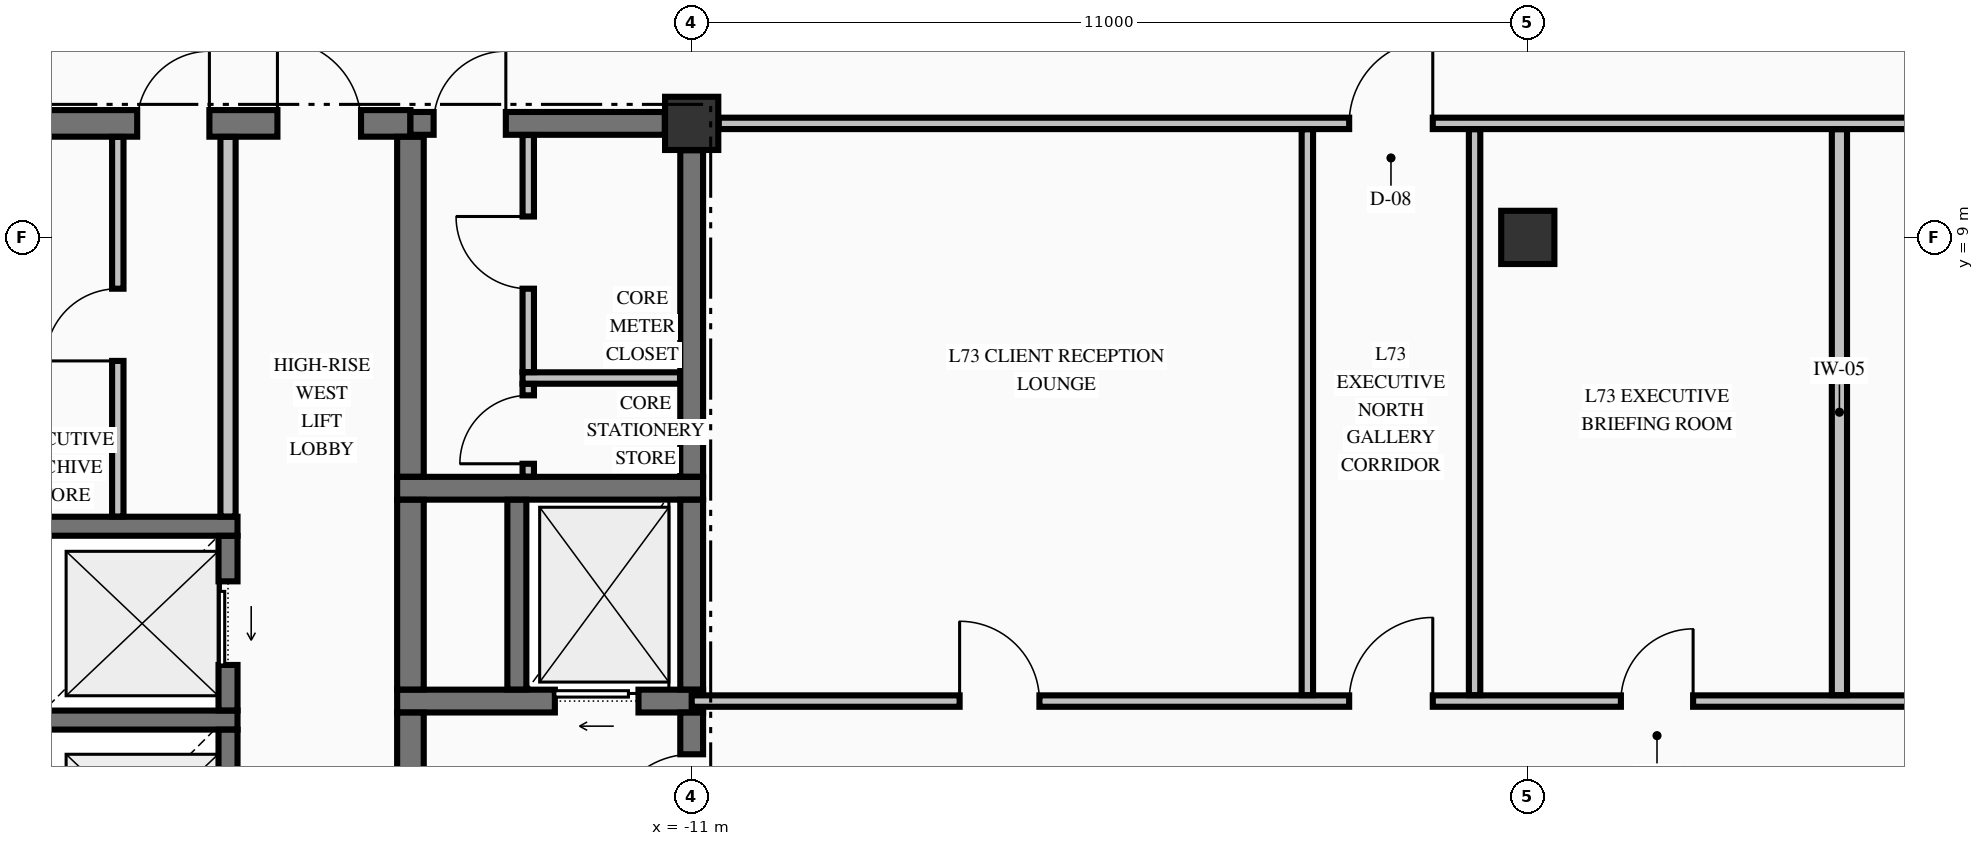
"""IFC4 building model, lengths in metres.
Left out: names, types, materials, properties, quantities, classifications, styles, units other than length and angle.
Written with IfcOpenShell. Run it as: python <this file> out.ifc"""

import sys

from ifc_helpers import new_model, si_unit, direction, frame, frame_2d, origin, origin_2d, place, context, subcontext, project, spatial, rectangle, extrude, element, fill, save


model = new_model("IFC4")
c1 = context("Model", 3, precision=1e-05, world=origin(), true_north=direction((0.0, 1.0)))
c2 = subcontext(c1, "Body", "Model", "MODEL_VIEW")
j1 = project(units=[si_unit("LENGTHUNIT", "METRE"), si_unit("PLANEANGLEUNIT", "RADIAN")], contexts=[c1])
p1 = place(None, origin())
s1 = spatial("IfcSite", under=j1, at=p1, CompositionType="ELEMENT")
p2 = place(p1, origin())
s2 = spatial("IfcBuilding", under=s1, at=p2, CompositionType="ELEMENT")
p3 = place(p2, frame((0.0, 0.0, 274.32)))
s3 = spatial("IfcBuildingStorey", under=s2, at=p3, CompositionType="ELEMENT", Elevation=274.32)
for number, where, z_axis, x_axis in (
    (1, (-11.0, 10.5, -0.25), (0.0, 0.0, 1.0), (1.0, 0.0, 0.0)),
    (2, (0.0, 9.0, -0.25), (0.0, 0.0, 1.0), (1.0, 0.0, 0.0)),
):
    element("IfcColumn", number, at=place(p3, frame(where, z_axis=z_axis, x_axis=x_axis)), inside=s3, PredefinedType="COLUMN", context=c2, shape_type="SweptSolid", body=[
        extrude(rectangle(XDim=0.7, YDim=0.7, at=origin_2d()), origin(), (0.0, 0.0, 1.0), 3.565),
    ])
p4 = place(p3, frame((-20.175, 2.65, 0.0), z_axis=(0.0, 0.0, 1.0), x_axis=(1.0, 0.0, 0.0)))
e3 = element("IfcWall", 3, at=p4, inside=s3, PredefinedType="SOLIDWALL", context=c2, shape_type="SweptSolid", body=[
    extrude(rectangle(XDim=3.2, YDim=0.25, at=frame_2d((1.6, 0.0))), origin(), (0.0, 0.0, 1.0), 3.315),
])
p5 = place(p3, frame((-14.875, 2.9, 0.0), z_axis=(0.0, 0.0, 1.0), x_axis=(1.0, 0.0, 0.0)))
e4 = element("IfcWall", 4, at=p5, inside=s3, PredefinedType="SHEAR", context=c2, shape_type="SweptSolid", body=[
    extrude(rectangle(XDim=4.025, YDim=0.3, at=frame_2d((2.012, 0.0))), origin(), (0.0, 0.0, 1.0), 3.315),
])
p6 = place(p5, frame((2.075, 0.0, 0.0)))
e5 = element("IfcOpeningElement", 5, at=p6, cuts=e4, PredefinedType="OPENING", context=c2, shape_type="SweptSolid", body=[
    extrude(rectangle(XDim=1.1, YDim=2.2, at=frame_2d((0.55, 1.1))), frame((0.0, 0.16, 0.0), z_axis=(0.0, -1.0, 0.0), x_axis=(1.0, 0.0, 0.0)), (0.0, 0.0, 1.0), 0.32),
])
p7 = place(p3, frame((-20.175, 5.2, 0.0), z_axis=(0.0, 0.0, 1.0), x_axis=(1.0, 0.0, 0.0)))
e6 = element("IfcWall", 6, at=p7, inside=s3, PredefinedType="SOLIDWALL", context=c2, shape_type="SweptSolid", body=[
    extrude(rectangle(XDim=3.2, YDim=0.25, at=frame_2d((1.6, 0.0))), origin(), (0.0, 0.0, 1.0), 3.315),
])
p8 = place(p3, frame((-14.875, 5.7, 0.0), z_axis=(0.0, 0.0, 1.0), x_axis=(1.0, 0.0, 0.0)))
e7 = element("IfcWall", 7, at=p8, inside=s3, PredefinedType="SHEAR", context=c2, shape_type="SweptSolid", body=[
    extrude(rectangle(XDim=4.025, YDim=0.3, at=frame_2d((2.012, 0.0))), origin(), (0.0, 0.0, 1.0), 3.315),
])
p9 = place(p3, frame((-19.646, 10.5, 0.0), z_axis=(0.0, 0.0, 1.0), x_axis=(1.0, 0.0, 0.0)))
e8 = element("IfcWall", 8, at=p9, inside=s3, PredefinedType="SHEAR", context=c2, shape_type="SweptSolid", body=[
    extrude(rectangle(XDim=4.946, YDim=0.35, at=frame_2d((2.473, 0.0))), origin(), (0.0, 0.0, 1.0), 3.315),
])
p10 = place(p9, frame((3.196, 0.0, 0.0)))
e9 = element("IfcOpeningElement", 9, at=p10, cuts=e8, PredefinedType="OPENING", context=c2, shape_type="SweptSolid", body=[
    extrude(rectangle(XDim=1.1, YDim=2.15, at=frame_2d((0.55, 1.075))), frame((0.0, 0.185, 0.0), z_axis=(0.0, -1.0, 0.0), x_axis=(1.0, 0.0, 0.0)), (0.0, 0.0, 1.0), 0.37),
])
p11 = place(p9, frame((1.351, 0.0, 0.0)))
e10 = element("IfcOpeningElement", 10, at=p11, cuts=e8, PredefinedType="OPENING", context=c2, shape_type="SweptSolid", body=[
    extrude(rectangle(XDim=0.95, YDim=2.15, at=frame_2d((0.475, 1.075))), frame((0.0, 0.185, 0.0), z_axis=(0.0, -1.0, 0.0), x_axis=(1.0, 0.0, 0.0)), (0.0, 0.0, 1.0), 0.37),
])
p12 = place(p3, frame((-14.7, 10.5, 0.0), z_axis=(0.0, 0.0, 1.0), x_axis=(1.0, 0.0, 0.0)))
e11 = element("IfcWall", 11, at=p12, inside=s3, PredefinedType="SHEAR", context=c2, shape_type="SweptSolid", body=[
    extrude(rectangle(XDim=3.346, YDim=0.3, at=frame_2d((1.673, 0.0))), origin(), (0.0, 0.0, 1.0), 3.315),
])
p13 = place(p12, frame((0.305, 0.0, 0.0)))
e12 = element("IfcOpeningElement", 12, at=p13, cuts=e11, PredefinedType="OPENING", context=c2, shape_type="SweptSolid", body=[
    extrude(rectangle(XDim=0.95, YDim=2.15, at=frame_2d((0.475, 1.075))), frame((0.0, 0.16, 0.0), z_axis=(0.0, -1.0, 0.0), x_axis=(1.0, 0.0, 0.0)), (0.0, 0.0, 1.0), 0.32),
])
p14 = place(p3, frame((-11.0, 2.9, 0.0), z_axis=(0.0, 0.0, 1.0), x_axis=(1.0, 0.0, 0.0)))
e13 = element("IfcWall", 13, at=p14, inside=s3, PredefinedType="PARTITIONING", context=c2, shape_type="SweptSolid", body=[
    extrude(rectangle(XDim=22.0, YDim=0.15, at=frame_2d((11.0, 0.0))), origin(), (0.0, 0.0, 1.0), 3.315),
])
p15 = place(p14, frame((8.65, 0.0, 0.0)))
e14 = element("IfcOpeningElement", 14, at=p15, cuts=e13, PredefinedType="OPENING", context=c2, shape_type="SweptSolid", body=[
    extrude(rectangle(XDim=1.1, YDim=2.15, at=frame_2d((0.55, 1.075))), frame((0.0, 0.085, 0.0), z_axis=(0.0, -1.0, 0.0), x_axis=(1.0, 0.0, 0.0)), (0.0, 0.0, 1.0), 0.17),
])
p16 = place(p14, frame((3.525, 0.0, 0.0)))
e15 = element("IfcOpeningElement", 15, at=p16, cuts=e13, PredefinedType="OPENING", context=c2, shape_type="SweptSolid", body=[
    extrude(rectangle(XDim=1.05, YDim=2.15, at=frame_2d((0.525, 1.075))), frame((0.0, 0.085, 0.0), z_axis=(0.0, -1.0, 0.0), x_axis=(1.0, 0.0, 0.0)), (0.0, 0.0, 1.0), 0.17),
])
p17 = place(p14, frame((12.225, 0.0, 0.0)))
e16 = element("IfcOpeningElement", 16, at=p17, cuts=e13, PredefinedType="OPENING", context=c2, shape_type="SweptSolid", body=[
    extrude(rectangle(XDim=0.95, YDim=2.15, at=frame_2d((0.475, 1.075))), frame((0.0, 0.085, 0.0), z_axis=(0.0, -1.0, 0.0), x_axis=(1.0, 0.0, 0.0)), (0.0, 0.0, 1.0), 0.17),
])
p18 = place(p14, frame((18.075, 0.0, 0.0)))
e17 = element("IfcOpeningElement", 17, at=p18, cuts=e13, PredefinedType="OPENING", context=c2, shape_type="SweptSolid", body=[
    extrude(rectangle(XDim=0.95, YDim=2.15, at=frame_2d((0.475, 1.075))), frame((0.0, 0.085, 0.0), z_axis=(0.0, -1.0, 0.0), x_axis=(1.0, 0.0, 0.0)), (0.0, 0.0, 1.0), 0.17),
])
p19 = place(p3, frame((-13.225, 7.15, 0.0), z_axis=(0.0, 0.0, 1.0), x_axis=(1.0, 0.0, 0.0)))
e18 = element("IfcWall", 18, at=p19, inside=s3, PredefinedType="PARTITIONING", context=c2, shape_type="SweptSolid", body=[
    extrude(rectangle(XDim=2.072, YDim=0.15, at=frame_2d((1.036, 0.0))), origin(), (0.0, 0.0, 1.0), 3.315),
])
p20 = place(p3, frame((-10.644, 10.5, 0.0), z_axis=(0.0, 0.0, 1.0), x_axis=(1.0, 0.0, 0.0)))
e19 = element("IfcWall", 19, at=p20, inside=s3, PredefinedType="PARTITIONING", context=c2, shape_type="SweptSolid", body=[
    extrude(rectangle(XDim=21.288, YDim=0.15, at=frame_2d((10.644, 0.0))), origin(), (0.0, 0.0, 1.0), 3.315),
])
p21 = place(p20, frame((8.294, 0.0, 0.0)))
e20 = element("IfcOpeningElement", 20, at=p21, cuts=e19, PredefinedType="OPENING", context=c2, shape_type="SweptSolid", body=[
    extrude(rectangle(XDim=1.1, YDim=2.15, at=frame_2d((0.55, 1.075))), frame((0.0, 0.085, 0.0), z_axis=(0.0, -1.0, 0.0), x_axis=(1.0, 0.0, 0.0)), (0.0, 0.0, 1.0), 0.17),
])
p22 = place(p3, frame((-17.1, -0.098, 0.0), z_axis=(0.0, 0.0, 1.0), x_axis=(0.0, 1.0, 0.0)))
e21 = element("IfcWall", 21, at=p22, inside=s3, PredefinedType="SOLIDWALL", context=c2, shape_type="SweptSolid", body=[
    extrude(rectangle(XDim=2.621, YDim=0.25, at=frame_2d((1.311, 0.0))), origin(), (0.0, 0.0, 1.0), 3.315),
])
p23 = place(p22, frame((0.748, 0.0, 0.0)))
e22 = element("IfcOpeningElement", 22, at=p23, cuts=e21, PredefinedType="OPENING", context=c2, shape_type="SweptSolid", body=[
    extrude(rectangle(XDim=1.1, YDim=2.2, at=frame_2d((0.55, 1.1))), frame((0.0, 0.135, 0.0), z_axis=(0.0, -1.0, 0.0), x_axis=(1.0, 0.0, 0.0)), (0.0, 0.0, 1.0), 0.27),
])
p24 = place(p3, frame((-17.1, 2.777, 0.0), z_axis=(0.0, 0.0, 1.0), x_axis=(0.0, 1.0, 0.0)))
e23 = element("IfcWall", 23, at=p24, inside=s3, PredefinedType="SOLIDWALL", context=c2, shape_type="SweptSolid", body=[
    extrude(rectangle(XDim=2.296, YDim=0.25, at=frame_2d((1.148, 0.0))), origin(), (0.0, 0.0, 1.0), 3.315),
])
p25 = place(p24, frame((0.598, 0.0, 0.0)))
e24 = element("IfcOpeningElement", 24, at=p25, cuts=e23, PredefinedType="OPENING", context=c2, shape_type="SweptSolid", body=[
    extrude(rectangle(XDim=1.1, YDim=2.2, at=frame_2d((0.55, 1.1))), frame((0.0, 0.135, 0.0), z_axis=(0.0, -1.0, 0.0), x_axis=(1.0, 0.0, 0.0)), (0.0, 0.0, 1.0), 0.27),
])
p26 = place(p3, frame((-14.7, -0.098, 0.0), z_axis=(0.0, 0.0, 1.0), x_axis=(0.0, 1.0, 0.0)))
e25 = element("IfcWall", 25, at=p26, inside=s3, PredefinedType="SHEAR", context=c2, shape_type="SweptSolid", body=[
    extrude(rectangle(XDim=2.846, YDim=0.35, at=frame_2d((1.423, 0.0))), origin(), (0.0, 0.0, 1.0), 3.315),
])
p27 = place(p3, frame((-14.7, 3.052, 0.0), z_axis=(0.0, 0.0, 1.0), x_axis=(0.0, 1.0, 0.0)))
e26 = element("IfcWall", 26, at=p27, inside=s3, PredefinedType="SHEAR", context=c2, shape_type="SweptSolid", body=[
    extrude(rectangle(XDim=2.496, YDim=0.35, at=frame_2d((1.248, 0.0))), origin(), (0.0, 0.0, 1.0), 3.315),
])
p28 = place(p3, frame((-14.7, 5.852, 0.0), z_axis=(0.0, 0.0, 1.0), x_axis=(0.0, 1.0, 0.0)))
e27 = element("IfcWall", 27, at=p28, inside=s3, PredefinedType="SHEAR", context=c2, shape_type="SweptSolid", body=[
    extrude(rectangle(XDim=4.471, YDim=0.35, at=frame_2d((2.235, 0.0))), origin(), (0.0, 0.0, 1.0), 3.315),
])
p29 = place(p3, frame((-13.3, 3.052, 0.0), z_axis=(0.0, 0.0, 1.0), x_axis=(0.0, 1.0, 0.0)))
e28 = element("IfcWall", 28, at=p29, inside=s3, PredefinedType="SOLIDWALL", context=c2, shape_type="SweptSolid", body=[
    extrude(rectangle(XDim=2.496, YDim=0.25, at=frame_2d((1.248, 0.0))), origin(), (0.0, 0.0, 1.0), 3.315),
])
p30 = place(p3, frame((-11.0, 0.354, 0.0), z_axis=(0.0, 0.0, 1.0), x_axis=(0.0, 1.0, 0.0)))
e29 = element("IfcWall", 29, at=p30, inside=s3, PredefinedType="SHEAR", context=c2, shape_type="SweptSolid", body=[
    extrude(rectangle(XDim=2.394, YDim=0.3, at=frame_2d((1.197, 0.0))), origin(), (0.0, 0.0, 1.0), 3.315),
])
p31 = place(p30, frame((0.746, 0.0, 0.0)))
e30 = element("IfcOpeningElement", 30, at=p31, cuts=e29, PredefinedType="OPENING", context=c2, shape_type="SweptSolid", body=[
    extrude(rectangle(XDim=1.1, YDim=2.15, at=frame_2d((0.55, 1.075))), frame((0.0, 0.16, 0.0), z_axis=(0.0, -1.0, 0.0), x_axis=(1.0, 0.0, 0.0)), (0.0, 0.0, 1.0), 0.32),
])
p32 = place(p3, frame((-11.0, 3.052, 0.0), z_axis=(0.0, 0.0, 1.0), x_axis=(0.0, 1.0, 0.0)))
e31 = element("IfcWall", 31, at=p32, inside=s3, PredefinedType="SHEAR", context=c2, shape_type="SweptSolid", body=[
    extrude(rectangle(XDim=2.496, YDim=0.3, at=frame_2d((1.248, 0.0))), origin(), (0.0, 0.0, 1.0), 3.315),
])
p33 = place(p3, frame((-11.0, 5.852, 0.0), z_axis=(0.0, 0.0, 1.0), x_axis=(0.0, 1.0, 0.0)))
e32 = element("IfcWall", 32, at=p33, inside=s3, PredefinedType="SHEAR", context=c2, shape_type="SweptSolid", body=[
    extrude(rectangle(XDim=4.294, YDim=0.3, at=frame_2d((2.147, 0.0))), origin(), (0.0, 0.0, 1.0), 3.315),
])
p34 = place(p3, frame((-18.55, 5.328, 0.0), z_axis=(0.0, 0.0, 1.0), x_axis=(0.0, 1.0, 0.0)))
e33 = element("IfcWall", 33, at=p34, inside=s3, PredefinedType="PARTITIONING", context=c2, shape_type="SweptSolid", body=[
    extrude(rectangle(XDim=4.994, YDim=0.15, at=frame_2d((2.497, 0.0))), origin(), (0.0, 0.0, 1.0), 3.315),
])
p35 = place(p34, frame((2.047, 0.0, 0.0)))
e34 = element("IfcOpeningElement", 34, at=p35, cuts=e33, PredefinedType="OPENING", context=c2, shape_type="SweptSolid", body=[
    extrude(rectangle(XDim=0.95, YDim=2.15, at=frame_2d((0.475, 1.075))), frame((0.0, 0.085, 0.0), z_axis=(0.0, -1.0, 0.0), x_axis=(1.0, 0.0, 0.0)), (0.0, 0.0, 1.0), 0.17),
])
p36 = place(p3, frame((-17.1, 5.328, 0.0), z_axis=(0.0, 0.0, 1.0), x_axis=(0.0, 1.0, 0.0)))
e35 = element("IfcWall", 35, at=p36, inside=s3, PredefinedType="PARTITIONING", context=c2, shape_type="SweptSolid", body=[
    extrude(rectangle(XDim=4.994, YDim=0.2, at=frame_2d((2.497, 0.0))), origin(), (0.0, 0.0, 1.0), 3.315),
])
p37 = place(p3, frame((-13.15, 5.853, 0.0), z_axis=(0.0, 0.0, 1.0), x_axis=(0.0, 1.0, 0.0)))
e36 = element("IfcWall", 36, at=p37, inside=s3, PredefinedType="PARTITIONING", context=c2, shape_type="SweptSolid", body=[
    extrude(rectangle(XDim=1.219, YDim=0.15, at=frame_2d((0.609, 0.0))), origin(), (0.0, 0.0, 1.0), 3.315),
])
p38 = place(p37, frame((0.169, 0.0, 0.0)))
e37 = element("IfcOpeningElement", 37, at=p38, cuts=e36, PredefinedType="OPENING", context=c2, shape_type="SweptSolid", body=[
    extrude(rectangle(XDim=0.9, YDim=2.15, at=frame_2d((0.45, 1.075))), frame((0.0, 0.085, 0.0), z_axis=(0.0, -1.0, 0.0), x_axis=(1.0, 0.0, 0.0)), (0.0, 0.0, 1.0), 0.17),
])
p39 = place(p3, frame((-13.15, 7.228, 0.0), z_axis=(0.0, 0.0, 1.0), x_axis=(0.0, 1.0, 0.0)))
e38 = element("IfcWall", 38, at=p39, inside=s3, PredefinedType="PARTITIONING", context=c2, shape_type="SweptSolid", body=[
    extrude(rectangle(XDim=3.119, YDim=0.15, at=frame_2d((1.56, 0.0))), origin(), (0.0, 0.0, 1.0), 3.315),
])
p40 = place(p39, frame((1.097, 0.0, 0.0)))
e39 = element("IfcOpeningElement", 39, at=p40, cuts=e38, PredefinedType="OPENING", context=c2, shape_type="SweptSolid", body=[
    extrude(rectangle(XDim=0.95, YDim=2.15, at=frame_2d((0.475, 1.075))), frame((0.0, 0.085, 0.0), z_axis=(0.0, -1.0, 0.0), x_axis=(1.0, 0.0, 0.0)), (0.0, 0.0, 1.0), 0.17),
])
for number, where, z_axis, x_axis in (
    (40, (-2.9, 2.978, 0.0), (0.0, 0.0, 1.0), (0.0, 1.0, 0.0)),
    (41, (-0.7, 2.978, 0.0), (0.0, 0.0, 1.0), (0.0, 1.0, 0.0)),
):
    element("IfcWall", number, at=place(p3, frame(where, z_axis=z_axis, x_axis=x_axis)), inside=s3, PredefinedType="PARTITIONING", context=c2, shape_type="SweptSolid", body=[
        extrude(rectangle(XDim=7.444, YDim=0.15, at=frame_2d((3.722, 0.0))), origin(), (0.0, 0.0, 1.0), 3.315),
    ])
p41 = place(p3, frame((4.1, 2.978, 0.0), z_axis=(0.0, 0.0, 1.0), x_axis=(0.0, 1.0, 0.0)))
e42 = element("IfcWall", 42, at=p41, inside=s3, PredefinedType="PARTITIONING", context=c2, shape_type="SweptSolid", body=[
    extrude(rectangle(XDim=7.444, YDim=0.2, at=frame_2d((3.722, 0.0))), origin(), (0.0, 0.0, 1.0), 3.315),
])
p42 = place(p31, origin())
e43 = element("IfcDoor", 43, at=p42, inside=s3, OperationType="SINGLE_SWING_LEFT", PredefinedType="DOOR", context=c2, shape_type="SweptSolid", body=[
    extrude(rectangle(XDim=1.1, YDim=2.15, at=frame_2d((0.55, 1.075))), frame((0.0, 0.025, 0.0), z_axis=(0.0, -1.0, 0.0), x_axis=(1.0, 0.0, 0.0)), (0.0, 0.0, 1.0), 0.05),
])
fill(e30, e43)
p43 = place(p6, origin())
e44 = element("IfcDoor", 44, at=p43, inside=s3, OperationType="SLIDING_TO_LEFT", PredefinedType="DOOR", context=c2, shape_type="SweptSolid", body=[
    extrude(rectangle(XDim=1.1, YDim=2.2, at=frame_2d((0.55, 1.1))), frame((0.0, 0.025, 0.0), z_axis=(0.0, -1.0, 0.0), x_axis=(1.0, 0.0, 0.0)), (0.0, 0.0, 1.0), 0.05),
])
fill(e5, e44)
p44 = place(p13, origin())
e45 = element("IfcDoor", 45, at=p44, inside=s3, OperationType="SINGLE_SWING_RIGHT", PredefinedType="DOOR", context=c2, shape_type="SweptSolid", body=[
    extrude(rectangle(XDim=0.95, YDim=2.15, at=frame_2d((0.475, 1.075))), frame((0.0, 0.025, 0.0), z_axis=(0.0, -1.0, 0.0), x_axis=(1.0, 0.0, 0.0)), (0.0, 0.0, 1.0), 0.05),
])
fill(e12, e45)
p45 = place(p38, origin())
e46 = element("IfcDoor", 46, at=p45, inside=s3, OperationType="SINGLE_SWING_LEFT", PredefinedType="DOOR", context=c2, shape_type="SweptSolid", body=[
    extrude(rectangle(XDim=0.9, YDim=2.15, at=frame_2d((0.45, 1.075))), frame((0.0, 0.025, 0.0), z_axis=(0.0, -1.0, 0.0), x_axis=(1.0, 0.0, 0.0)), (0.0, 0.0, 1.0), 0.05),
])
fill(e37, e46)
p46 = place(p40, origin())
e47 = element("IfcDoor", 47, at=p46, inside=s3, OperationType="SINGLE_SWING_RIGHT", PredefinedType="DOOR", context=c2, shape_type="SweptSolid", body=[
    extrude(rectangle(XDim=0.95, YDim=2.15, at=frame_2d((0.475, 1.075))), frame((0.0, 0.025, 0.0), z_axis=(0.0, -1.0, 0.0), x_axis=(1.0, 0.0, 0.0)), (0.0, 0.0, 1.0), 0.05),
])
fill(e39, e47)
p47 = place(p25, origin())
e48 = element("IfcDoor", 48, at=p47, inside=s3, OperationType="SLIDING_TO_LEFT", PredefinedType="DOOR", context=c2, shape_type="SweptSolid", body=[
    extrude(rectangle(XDim=1.1, YDim=2.2, at=frame_2d((0.55, 1.1))), frame((0.0, 0.025, 0.0), z_axis=(0.0, -1.0, 0.0), x_axis=(1.0, 0.0, 0.0)), (0.0, 0.0, 1.0), 0.05),
])
fill(e24, e48)
p48 = place(p10, origin())
e49 = element("IfcDoor", 49, at=p48, inside=s3, OperationType="SINGLE_SWING_LEFT", PredefinedType="DOOR", context=c2, shape_type="SweptSolid", body=[
    extrude(rectangle(XDim=1.1, YDim=2.15, at=frame_2d((0.55, 1.075))), frame((0.0, 0.025, 0.0), z_axis=(0.0, -1.0, 0.0), x_axis=(1.0, 0.0, 0.0)), (0.0, 0.0, 1.0), 0.05),
])
fill(e9, e49)
p49 = place(p11, origin())
e50 = element("IfcDoor", 50, at=p49, inside=s3, OperationType="SINGLE_SWING_RIGHT", PredefinedType="DOOR", context=c2, shape_type="SweptSolid", body=[
    extrude(rectangle(XDim=0.95, YDim=2.15, at=frame_2d((0.475, 1.075))), frame((0.0, 0.025, 0.0), z_axis=(0.0, -1.0, 0.0), x_axis=(1.0, 0.0, 0.0)), (0.0, 0.0, 1.0), 0.05),
])
fill(e10, e50)
p50 = place(p35, origin())
e51 = element("IfcDoor", 51, at=p50, inside=s3, OperationType="SINGLE_SWING_LEFT", PredefinedType="DOOR", context=c2, shape_type="SweptSolid", body=[
    extrude(rectangle(XDim=0.95, YDim=2.15, at=frame_2d((0.475, 1.075))), frame((0.0, 0.025, 0.0), z_axis=(0.0, -1.0, 0.0), x_axis=(1.0, 0.0, 0.0)), (0.0, 0.0, 1.0), 0.05),
])
fill(e34, e51)
p51 = place(p21, origin())
e52 = element("IfcDoor", 52, at=p51, inside=s3, OperationType="SINGLE_SWING_RIGHT", PredefinedType="DOOR", context=c2, shape_type="SweptSolid", body=[
    extrude(rectangle(XDim=1.1, YDim=2.15, at=frame_2d((0.55, 1.075))), frame((0.0, 0.025, 0.0), z_axis=(0.0, -1.0, 0.0), x_axis=(1.0, 0.0, 0.0)), (0.0, 0.0, 1.0), 0.05),
])
fill(e20, e52)
p52 = place(p15, origin())
e53 = element("IfcDoor", 53, at=p52, inside=s3, OperationType="SINGLE_SWING_RIGHT", PredefinedType="DOOR", context=c2, shape_type="SweptSolid", body=[
    extrude(rectangle(XDim=1.1, YDim=2.15, at=frame_2d((0.55, 1.075))), frame((0.0, 0.025, 0.0), z_axis=(0.0, -1.0, 0.0), x_axis=(1.0, 0.0, 0.0)), (0.0, 0.0, 1.0), 0.05),
])
fill(e14, e53)
p53 = place(p16, origin())
e54 = element("IfcDoor", 54, at=p53, inside=s3, OperationType="SINGLE_SWING_LEFT", PredefinedType="DOOR", context=c2, shape_type="SweptSolid", body=[
    extrude(rectangle(XDim=1.05, YDim=2.15, at=frame_2d((0.525, 1.075))), frame((0.0, 0.025, 0.0), z_axis=(0.0, -1.0, 0.0), x_axis=(1.0, 0.0, 0.0)), (0.0, 0.0, 1.0), 0.05),
])
fill(e15, e54)
p54 = place(p17, origin())
e55 = element("IfcDoor", 55, at=p54, inside=s3, OperationType="SINGLE_SWING_RIGHT", PredefinedType="DOOR", context=c2, shape_type="SweptSolid", body=[
    extrude(rectangle(XDim=0.95, YDim=2.15, at=frame_2d((0.475, 1.075))), frame((0.0, 0.025, 0.0), z_axis=(0.0, -1.0, 0.0), x_axis=(1.0, 0.0, 0.0)), (0.0, 0.0, 1.0), 0.05),
])
fill(e16, e55)
save(model, sys.argv[1])
